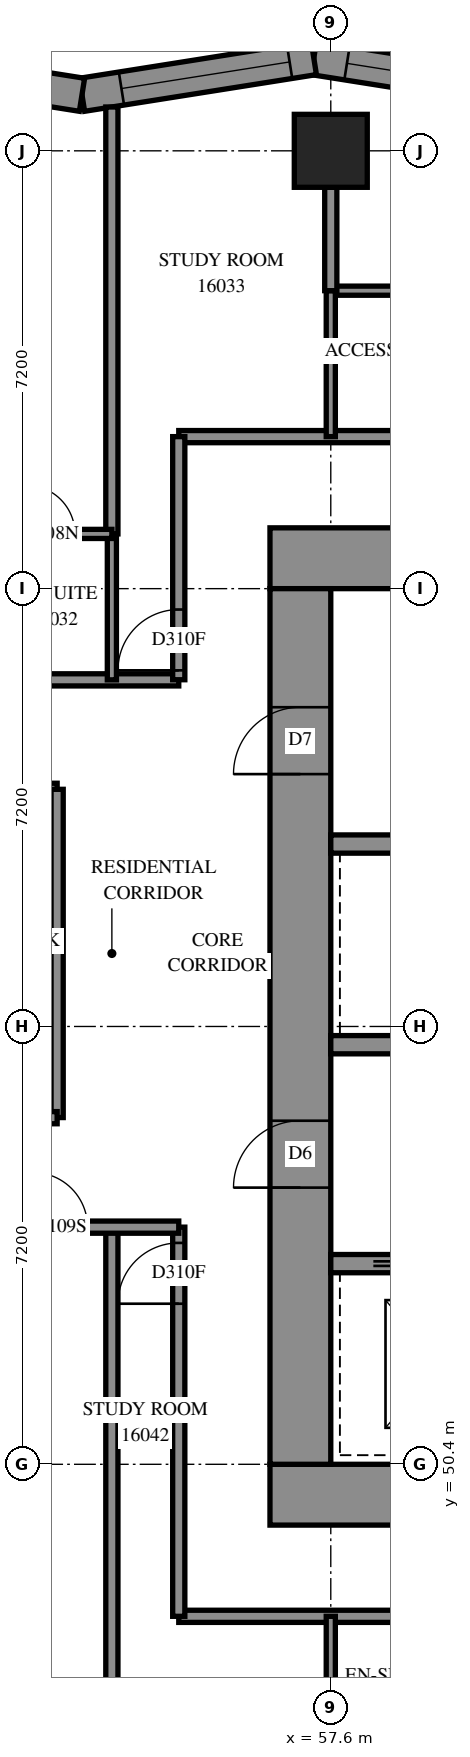
"""IFC4 building model, lengths in metres.
Left out: names, types, materials, properties, quantities, classifications, styles, units other than length and angle.
Written with IfcOpenShell. Run it as: python <this file> out.ifc"""

import sys

from ifc_helpers import new_model, si_unit, direction, frame, frame_2d, origin, origin_2d, place, context, subcontext, project, spatial, polyline, rectangle, outline, extrude, element, fill, save


model = new_model("IFC4")
c1 = context("Model", 3, precision=1e-05, world=origin(), true_north=direction((0.0, 1.0)))
c2 = subcontext(c1, "Body", "Model", "MODEL_VIEW")
j1 = project(units=[si_unit("LENGTHUNIT", "METRE"), si_unit("PLANEANGLEUNIT", "RADIAN")], contexts=[c1])
p1 = place(None, origin())
s1 = spatial("IfcSite", under=j1, at=p1, CompositionType="ELEMENT")
p2 = place(p1, origin())
s2 = spatial("IfcBuilding", under=s1, at=p2, CompositionType="ELEMENT")
p3 = place(p2, frame((0.0, 0.0, 61.0)))
s3 = spatial("IfcBuildingStorey", under=s2, at=p3, CompositionType="ELEMENT", Elevation=61.0)
p4 = place(p3, frame((57.6, 72.0, 0.0), z_axis=(0.0, 0.0, 1.0), x_axis=(1.0, 0.0, 0.0)))
e1 = element("IfcColumn", 1, at=p4, inside=s3, PredefinedType="COLUMN", context=c2, shape_type="SweptSolid", body=[
    extrude(rectangle(XDim=1.2, YDim=1.2, at=origin_2d()), origin(), (0.0, 0.0, 1.0), 3.1),
])
p5 = place(p3, frame((56.6, 49.9, -0.3), z_axis=(0.0, 0.0, 1.0), x_axis=(1.0, 0.0, 0.0)))
e2 = element("IfcWall", 2, at=p5, inside=s3, PredefinedType="SHEAR", context=c2, shape_type="SweptSolid", body=[
    extrude(rectangle(XDim=16.4, YDim=1.0, at=frame_2d((8.2, 0.0))), origin(), (0.0, 0.0, 1.0), 2.7),
])
p6 = place(p3, frame((56.6, 65.3, -0.3), z_axis=(0.0, 0.0, 1.0), x_axis=(1.0, 0.0, 0.0)))
e3 = element("IfcWall", 3, at=p6, inside=s3, PredefinedType="SHEAR", context=c2, shape_type="SweptSolid", body=[
    extrude(rectangle(XDim=16.4, YDim=1.0, at=frame_2d((8.2, 0.0))), origin(), (0.0, 0.0, 1.0), 2.7),
])
p7 = place(p6, frame((11.0, 0.0, 0.3)))
e4 = element("IfcOpeningElement", 4, at=p7, cuts=e3, PredefinedType="OPENING", context=c2, shape_type="SweptSolid", body=[
    extrude(rectangle(XDim=0.8, YDim=2.1, at=frame_2d((0.4, 1.05))), frame((0.0, 0.51, 0.0), z_axis=(0.0, -1.0, 0.0), x_axis=(1.0, 0.0, 0.0)), (0.0, 0.0, 1.0), 1.02),
])
p8 = place(p3, frame((57.1, 50.4, -0.3), z_axis=(0.0, 0.0, 1.0), x_axis=(0.0, 1.0, 0.0)))
e5 = element("IfcWall", 5, at=p8, inside=s3, PredefinedType="SHEAR", context=c2, shape_type="SweptSolid", body=[
    extrude(rectangle(XDim=14.4, YDim=1.0, at=frame_2d((7.2, 0.0))), origin(), (0.0, 0.0, 1.0), 2.7),
])
p9 = place(p8, frame((4.55, 0.0, 0.3)))
e6 = element("IfcOpeningElement", 6, at=p9, cuts=e5, PredefinedType="OPENING", context=c2, shape_type="SweptSolid", body=[
    extrude(rectangle(XDim=1.1, YDim=2.1, at=frame_2d((0.55, 1.05))), frame((0.0, 0.51, 0.0), z_axis=(0.0, -1.0, 0.0), x_axis=(1.0, 0.0, 0.0)), (0.0, 0.0, 1.0), 1.02),
])
p10 = place(p8, frame((11.35, 0.0, 0.3)))
e7 = element("IfcOpeningElement", 7, at=p10, cuts=e5, PredefinedType="OPENING", context=c2, shape_type="SweptSolid", body=[
    extrude(rectangle(XDim=1.1, YDim=2.1, at=frame_2d((0.55, 1.05))), frame((0.0, 0.51, 0.0), z_axis=(0.0, -1.0, 0.0), x_axis=(1.0, 0.0, 0.0)), (0.0, 0.0, 1.0), 1.02),
])
p11 = place(p3, frame((57.6, 53.7, 0.0), z_axis=(0.0, 0.0, 1.0), x_axis=(1.0, 0.0, 0.0)))
e8 = element("IfcWall", 8, at=p11, inside=s3, PredefinedType="SOLIDWALL", context=c2, shape_type="SweptSolid", body=[
    extrude(rectangle(XDim=14.4, YDim=0.3, at=frame_2d((7.2, 0.0))), origin(), (0.0, 0.0, 1.0), 3.1),
])
p12 = place(p11, frame((1.25, 0.0, 0.0)))
e9 = element("IfcOpeningElement", 9, at=p12, cuts=e8, PredefinedType="OPENING", context=c2, shape_type="SweptSolid", body=[
    extrude(rectangle(XDim=1.1, YDim=2.1, at=frame_2d((0.55, 1.05))), frame((0.0, 0.16, 0.0), z_axis=(0.0, -1.0, 0.0), x_axis=(1.0, 0.0, 0.0)), (0.0, 0.0, 1.0), 0.32),
])
p13 = place(p11, frame((4.85, 0.0, 0.0)))
e10 = element("IfcOpeningElement", 10, at=p13, cuts=e8, PredefinedType="OPENING", context=c2, shape_type="SweptSolid", body=[
    extrude(rectangle(XDim=1.1, YDim=2.1, at=frame_2d((0.55, 1.05))), frame((0.0, 0.16, 0.0), z_axis=(0.0, -1.0, 0.0), x_axis=(1.0, 0.0, 0.0)), (0.0, 0.0, 1.0), 0.32),
])
p14 = place(p11, frame((8.45, 0.0, 0.0)))
e11 = element("IfcOpeningElement", 11, at=p14, cuts=e8, PredefinedType="OPENING", context=c2, shape_type="SweptSolid", body=[
    extrude(rectangle(XDim=1.1, YDim=2.1, at=frame_2d((0.55, 1.05))), frame((0.0, 0.16, 0.0), z_axis=(0.0, -1.0, 0.0), x_axis=(1.0, 0.0, 0.0)), (0.0, 0.0, 1.0), 0.32),
])
p15 = place(p11, frame((12.05, 0.0, 0.0)))
e12 = element("IfcOpeningElement", 12, at=p15, cuts=e8, PredefinedType="OPENING", context=c2, shape_type="SweptSolid", body=[
    extrude(rectangle(XDim=1.1, YDim=2.1, at=frame_2d((0.55, 1.05))), frame((0.0, 0.16, 0.0), z_axis=(0.0, -1.0, 0.0), x_axis=(1.0, 0.0, 0.0)), (0.0, 0.0, 1.0), 0.32),
])
p16 = place(p3, frame((57.6, 57.3, 0.0), z_axis=(0.0, 0.0, 1.0), x_axis=(1.0, 0.0, 0.0)))
e13 = element("IfcWall", 13, at=p16, inside=s3, PredefinedType="SOLIDWALL", context=c2, shape_type="SweptSolid", body=[
    extrude(rectangle(XDim=14.4, YDim=0.3, at=frame_2d((7.2, 0.0))), origin(), (0.0, 0.0, 1.0), 3.1),
])
p17 = place(p16, frame((12.05, 0.0, 0.0)))
e14 = element("IfcOpeningElement", 14, at=p17, cuts=e13, PredefinedType="OPENING", context=c2, shape_type="SweptSolid", body=[
    extrude(rectangle(XDim=1.1, YDim=2.1, at=frame_2d((0.55, 1.05))), frame((0.0, 0.16, 0.0), z_axis=(0.0, -1.0, 0.0), x_axis=(1.0, 0.0, 0.0)), (0.0, 0.0, 1.0), 0.32),
])
p18 = place(p3, frame((57.6, 60.6, 0.0), z_axis=(0.0, 0.0, 1.0), x_axis=(1.0, 0.0, 0.0)))
e15 = element("IfcWall", 15, at=p18, inside=s3, PredefinedType="SOLIDWALL", context=c2, shape_type="SweptSolid", body=[
    extrude(rectangle(XDim=7.2, YDim=0.3, at=frame_2d((3.6, 0.0))), origin(), (0.0, 0.0, 1.0), 3.1),
])
p19 = place(p3, frame((61.133, 72.922, 0.0), z_axis=(0.0, 0.0, 1.0), x_axis=(-0.9877213372, 0.1562259905, 0.0)))
e16 = element("IfcWall", 16, at=p19, inside=s3, PredefinedType="SOLIDWALL", context=c2, shape_type="SweptSolid", body=[
    extrude(outline(polyline([(0.043, -0.275), (3.903, -0.275), (3.816, 0.275), (-0.043, 0.275), (0.043, -0.275)])), origin(), (0.0, 0.0, 1.0), 3.1),
])
p20 = place(p19, frame((0.508, 0.0, 0.5)))
e17 = element("IfcOpeningElement", 17, at=p20, cuts=e16, PredefinedType="OPENING", context=c2, shape_type="SweptSolid", body=[
    extrude(rectangle(XDim=2.8, YDim=2.45, at=frame_2d((1.4, 1.225))), frame((0.0, 0.285, 0.0), z_axis=(0.0, -1.0, 0.0), x_axis=(1.0, 0.0, 0.0)), (0.0, 0.0, 1.0), 0.57),
])
p21 = place(p3, frame((57.321, 73.525, 0.0), z_axis=(0.0, 0.0, 1.0), x_axis=(-0.9877213372, -0.1562259905, 0.0)))
e18 = element("IfcWall", 18, at=p21, inside=s3, PredefinedType="SOLIDWALL", context=c2, shape_type="SweptSolid", body=[
    extrude(outline(polyline([(-0.043, -0.275), (3.816, -0.275), (3.903, 0.275), (0.043, 0.275), (-0.043, -0.275)])), origin(), (0.0, 0.0, 1.0), 3.1),
])
p22 = place(p21, frame((0.403, 0.0, 0.5)))
e19 = element("IfcOpeningElement", 19, at=p22, cuts=e18, PredefinedType="OPENING", context=c2, shape_type="SweptSolid", body=[
    extrude(rectangle(XDim=2.8, YDim=2.45, at=frame_2d((1.4, 1.225))), frame((0.0, 0.285, 0.0), z_axis=(0.0, -1.0, 0.0), x_axis=(1.0, 0.0, 0.0)), (0.0, 0.0, 1.0), 0.57),
])
p23 = place(p3, frame((53.509, 72.922, 0.0), z_axis=(0.0, 0.0, 1.0), x_axis=(-0.9877213372, 0.1562259905, 0.0)))
e20 = element("IfcWall", 20, at=p23, inside=s3, PredefinedType="SOLIDWALL", context=c2, shape_type="SweptSolid", body=[
    extrude(outline(polyline([(0.043, -0.275), (3.903, -0.275), (3.816, 0.275), (-0.043, 0.275), (0.043, -0.275)])), origin(), (0.0, 0.0, 1.0), 3.1),
])
p24 = place(p23, frame((1.074, 0.0, 0.5)))
e21 = element("IfcOpeningElement", 21, at=p24, cuts=e20, PredefinedType="OPENING", context=c2, shape_type="SweptSolid", body=[
    extrude(rectangle(XDim=1.2, YDim=2.45, at=frame_2d((0.6, 1.225))), frame((0.0, 0.285, 0.0), z_axis=(0.0, -1.0, 0.0), x_axis=(1.0, 0.0, 0.0)), (0.0, 0.0, 1.0), 0.57),
])
p25 = place(p3, frame((28.8, 61.5, 0.0), z_axis=(0.0, 0.0, 1.0), x_axis=(1.0, 0.0, 0.0)))
e22 = element("IfcWall", 22, at=p25, inside=s3, PredefinedType="PARTITIONING", context=c2, shape_type="SweptSolid", body=[
    extrude(rectangle(XDim=24.3, YDim=0.2, at=frame_2d((12.15, 0.0))), origin(), (0.0, 0.0, 1.0), 3.1),
])
p26 = place(p25, frame((3.899, 0.0, 0.0)))
e23 = element("IfcOpeningElement", 23, at=p26, cuts=e22, PredefinedType="OPENING", context=c2, shape_type="SweptSolid", body=[
    extrude(rectangle(XDim=0.9, YDim=2.1, at=frame_2d((0.45, 1.05))), frame((0.0, 0.11, 0.0), z_axis=(0.0, -1.0, 0.0), x_axis=(1.0, 0.0, 0.0)), (0.0, 0.0, 1.0), 0.22),
])
p27 = place(p25, frame((9.5, 0.0, 0.0)))
e24 = element("IfcOpeningElement", 24, at=p27, cuts=e22, PredefinedType="OPENING", context=c2, shape_type="SweptSolid", body=[
    extrude(rectangle(XDim=0.9, YDim=2.1, at=frame_2d((0.45, 1.05))), frame((0.0, 0.11, 0.0), z_axis=(0.0, -1.0, 0.0), x_axis=(1.0, 0.0, 0.0)), (0.0, 0.0, 1.0), 0.22),
])
p28 = place(p25, frame((11.307, 0.0, 0.0)))
e25 = element("IfcOpeningElement", 25, at=p28, cuts=e22, PredefinedType="OPENING", context=c2, shape_type="SweptSolid", body=[
    extrude(rectangle(XDim=1.0, YDim=2.1, at=frame_2d((0.5, 1.05))), frame((0.0, 0.11, 0.0), z_axis=(0.0, -1.0, 0.0), x_axis=(1.0, 0.0, 0.0)), (0.0, 0.0, 1.0), 0.22),
])
p29 = place(p25, frame((16.7, 0.0, 0.0)))
e26 = element("IfcOpeningElement", 26, at=p29, cuts=e22, PredefinedType="OPENING", context=c2, shape_type="SweptSolid", body=[
    extrude(rectangle(XDim=0.9, YDim=2.1, at=frame_2d((0.45, 1.05))), frame((0.0, 0.11, 0.0), z_axis=(0.0, -1.0, 0.0), x_axis=(1.0, 0.0, 0.0)), (0.0, 0.0, 1.0), 0.22),
])
p30 = place(p25, frame((18.508, 0.0, 0.0)))
e27 = element("IfcOpeningElement", 27, at=p30, cuts=e22, PredefinedType="OPENING", context=c2, shape_type="SweptSolid", body=[
    extrude(rectangle(XDim=1.0, YDim=2.1, at=frame_2d((0.5, 1.05))), frame((0.0, 0.11, 0.0), z_axis=(0.0, -1.0, 0.0), x_axis=(1.0, 0.0, 0.0)), (0.0, 0.0, 1.0), 0.22),
])
p31 = place(p25, frame((23.033, 0.0, 0.0)))
e28 = element("IfcOpeningElement", 28, at=p31, cuts=e22, PredefinedType="OPENING", context=c2, shape_type="SweptSolid", body=[
    extrude(rectangle(XDim=1.0, YDim=2.1, at=frame_2d((0.5, 1.05))), frame((0.0, 0.11, 0.0), z_axis=(0.0, -1.0, 0.0), x_axis=(1.0, 0.0, 0.0)), (0.0, 0.0, 1.0), 0.22),
])
p32 = place(p3, frame((33.302, 63.3, 0.0), z_axis=(0.0, 0.0, 1.0), x_axis=(1.0, 0.0, 0.0)))
e29 = element("IfcWall", 29, at=p32, inside=s3, PredefinedType="PARTITIONING", context=c2, shape_type="SweptSolid", body=[
    extrude(rectangle(XDim=21.798, YDim=0.2, at=frame_2d((10.899, 0.0))), origin(), (0.0, 0.0, 1.0), 3.1),
])
p33 = place(p32, frame((1.091, 0.0, 0.0)))
e30 = element("IfcOpeningElement", 30, at=p33, cuts=e29, PredefinedType="OPENING", context=c2, shape_type="SweptSolid", body=[
    extrude(rectangle(XDim=0.9, YDim=2.1, at=frame_2d((0.45, 1.05))), frame((0.0, 0.11, 0.0), z_axis=(0.0, -1.0, 0.0), x_axis=(1.0, 0.0, 0.0)), (0.0, 0.0, 1.0), 0.22),
])
p34 = place(p32, frame((8.248, 0.0, 0.0)))
e31 = element("IfcOpeningElement", 31, at=p34, cuts=e29, PredefinedType="OPENING", context=c2, shape_type="SweptSolid", body=[
    extrude(rectangle(XDim=0.9, YDim=2.1, at=frame_2d((0.45, 1.05))), frame((0.0, 0.11, 0.0), z_axis=(0.0, -1.0, 0.0), x_axis=(1.0, 0.0, 0.0)), (0.0, 0.0, 1.0), 0.22),
])
p35 = place(p32, frame((15.448, 0.0, 0.0)))
e32 = element("IfcOpeningElement", 32, at=p35, cuts=e29, PredefinedType="OPENING", context=c2, shape_type="SweptSolid", body=[
    extrude(rectangle(XDim=0.9, YDim=2.1, at=frame_2d((0.45, 1.05))), frame((0.0, 0.11, 0.0), z_axis=(0.0, -1.0, 0.0), x_axis=(1.0, 0.0, 0.0)), (0.0, 0.0, 1.0), 0.22),
])
p36 = place(p3, frame((55.1, 67.3, 0.0), z_axis=(0.0, 0.0, 1.0), x_axis=(1.0, 0.0, 0.0)))
e33 = element("IfcWall", 33, at=p36, inside=s3, PredefinedType="PARTITIONING", context=c2, shape_type="SweptSolid", body=[
    extrude(rectangle(XDim=19.4, YDim=0.2, at=frame_2d((9.7, 0.0))), origin(), (0.0, 0.0, 1.0), 3.1),
])
p37 = place(p36, frame((6.361, 0.0, 0.0)))
e34 = element("IfcOpeningElement", 34, at=p37, cuts=e33, PredefinedType="OPENING", context=c2, shape_type="SweptSolid", body=[
    extrude(rectangle(XDim=0.9, YDim=2.1, at=frame_2d((0.45, 1.05))), frame((0.0, 0.11, 0.0), z_axis=(0.0, -1.0, 0.0), x_axis=(1.0, 0.0, 0.0)), (0.0, 0.0, 1.0), 0.22),
])
p38 = place(p36, frame((13.561, 0.0, 0.0)))
e35 = element("IfcOpeningElement", 35, at=p38, cuts=e33, PredefinedType="OPENING", context=c2, shape_type="SweptSolid", body=[
    extrude(rectangle(XDim=0.9, YDim=2.1, at=frame_2d((0.45, 1.05))), frame((0.0, 0.11, 0.0), z_axis=(0.0, -1.0, 0.0), x_axis=(1.0, 0.0, 0.0)), (0.0, 0.0, 1.0), 0.22),
])
p39 = place(p3, frame((55.1, 47.9, 0.0), z_axis=(0.0, 0.0, 1.0), x_axis=(1.0, 0.0, 0.0)))
e36 = element("IfcWall", 36, at=p39, inside=s3, PredefinedType="PARTITIONING", context=c2, shape_type="SweptSolid", body=[
    extrude(rectangle(XDim=19.208, YDim=0.2, at=frame_2d((9.604, 0.0))), origin(), (0.0, 0.0, 1.0), 3.1),
])
p40 = place(p39, frame((6.399, 0.0, 0.0)))
e37 = element("IfcOpeningElement", 37, at=p40, cuts=e36, PredefinedType="OPENING", context=c2, shape_type="SweptSolid", body=[
    extrude(rectangle(XDim=0.9, YDim=2.1, at=frame_2d((0.45, 1.05))), frame((0.0, 0.11, 0.0), z_axis=(0.0, -1.0, 0.0), x_axis=(1.0, 0.0, 0.0)), (0.0, 0.0, 1.0), 0.22),
])
p41 = place(p39, frame((13.561, 0.0, 0.0)))
e38 = element("IfcOpeningElement", 38, at=p41, cuts=e36, PredefinedType="OPENING", context=c2, shape_type="SweptSolid", body=[
    extrude(rectangle(XDim=0.9, YDim=2.1, at=frame_2d((0.45, 1.05))), frame((0.0, 0.11, 0.0), z_axis=(0.0, -1.0, 0.0), x_axis=(1.0, 0.0, 0.0)), (0.0, 0.0, 1.0), 0.22),
])
p42 = place(p3, frame((54.0, 42.312, 0.0), z_axis=(0.0, 0.0, 1.0), x_axis=(0.0, 1.0, 0.0)))
e39 = element("IfcWall", 39, at=p42, inside=s3, PredefinedType="PARTITIONING", context=c2, shape_type="SweptSolid", body=[
    extrude(rectangle(XDim=11.988, YDim=0.2, at=frame_2d((5.994, 0.0))), origin(), (0.0, 0.0, 1.0), 3.1),
])
p43 = place(p3, frame((54.0, 65.7, 0.0), z_axis=(0.0, 0.0, 1.0), x_axis=(0.0, 1.0, 0.0)))
e40 = element("IfcWall", 40, at=p43, inside=s3, PredefinedType="PARTITIONING", context=c2, shape_type="SweptSolid", body=[
    extrude(rectangle(XDim=7.021, YDim=0.2, at=frame_2d((3.51, 0.0))), origin(), (0.0, 0.0, 1.0), 3.1),
])
p44 = place(p3, frame((55.1, 47.9, 0.0), z_axis=(0.0, 0.0, 1.0), x_axis=(0.0, 1.0, 0.0)))
e41 = element("IfcWall", 41, at=p44, inside=s3, PredefinedType="PARTITIONING", context=c2, shape_type="SweptSolid", body=[
    extrude(rectangle(XDim=6.4, YDim=0.2, at=frame_2d((3.2, 0.0))), origin(), (0.0, 0.0, 1.0), 3.1),
])
p45 = place(p44, frame((5.141, 0.0, 0.0)))
e42 = element("IfcOpeningElement", 42, at=p45, cuts=e41, PredefinedType="OPENING", context=c2, shape_type="SweptSolid", body=[
    extrude(rectangle(XDim=1.0, YDim=2.1, at=frame_2d((0.5, 1.05))), frame((0.0, 0.11, 0.0), z_axis=(0.0, -1.0, 0.0), x_axis=(1.0, 0.0, 0.0)), (0.0, 0.0, 1.0), 0.22),
])
p46 = place(p3, frame((53.1, 56.102, 0.0), z_axis=(0.0, 0.0, 1.0), x_axis=(0.0, 1.0, 0.0)))
e43 = element("IfcWall", 43, at=p46, inside=s3, PredefinedType="PARTITIONING", context=c2, shape_type="SweptSolid", body=[
    extrude(rectangle(XDim=5.398, YDim=0.2, at=frame_2d((2.699, 0.0))), origin(), (0.0, 0.0, 1.0), 3.1),
])
p47 = place(p3, frame((50.4, 54.3, 0.0), z_axis=(0.0, 0.0, 1.0), x_axis=(1.0, 0.0, 0.0)))
e44 = element("IfcWall", 44, at=p47, inside=s3, PredefinedType="PARTITIONING", context=c2, shape_type="SweptSolid", body=[
    extrude(rectangle(XDim=4.7, YDim=0.2, at=frame_2d((2.35, 0.0))), origin(), (0.0, 0.0, 1.0), 3.1),
])
p48 = place(p47, frame((2.3, 0.0, 0.0)))
e45 = element("IfcOpeningElement", 45, at=p48, cuts=e44, PredefinedType="OPENING", context=c2, shape_type="SweptSolid", body=[
    extrude(rectangle(XDim=0.9, YDim=2.1, at=frame_2d((0.45, 1.05))), frame((0.0, 0.11, 0.0), z_axis=(0.0, -1.0, 0.0), x_axis=(1.0, 0.0, 0.0)), (0.0, 0.0, 1.0), 0.22),
])
p49 = place(p3, frame((55.1, 63.302, 0.0), z_axis=(0.0, 0.0, 1.0), x_axis=(0.0, 1.0, 0.0)))
e46 = element("IfcWall", 46, at=p49, inside=s3, PredefinedType="PARTITIONING", context=c2, shape_type="SweptSolid", body=[
    extrude(rectangle(XDim=3.998, YDim=0.2, at=frame_2d((1.999, 0.0))), origin(), (0.0, 0.0, 1.0), 3.1),
])
p50 = place(p49, frame((0.154, 0.0, 0.0)))
e47 = element("IfcOpeningElement", 47, at=p50, cuts=e46, PredefinedType="OPENING", context=c2, shape_type="SweptSolid", body=[
    extrude(rectangle(XDim=1.0, YDim=2.1, at=frame_2d((0.5, 1.05))), frame((0.0, 0.11, 0.0), z_axis=(0.0, -1.0, 0.0), x_axis=(1.0, 0.0, 0.0)), (0.0, 0.0, 1.0), 0.22),
])
p51 = place(p3, frame((57.6, 69.7, 0.0), z_axis=(0.0, 0.0, 1.0), x_axis=(1.0, 0.0, 0.0)))
e48 = element("IfcWall", 48, at=p51, inside=s3, PredefinedType="PARTITIONING", context=c2, shape_type="SweptSolid", body=[
    extrude(rectangle(XDim=3.2, YDim=0.15, at=frame_2d((1.6, 0.0))), origin(), (0.0, 0.0, 1.0), 3.1),
])
p52 = place(p51, frame((1.196, 0.0, 0.0)))
e49 = element("IfcOpeningElement", 49, at=p52, cuts=e48, PredefinedType="OPENING", context=c2, shape_type="SweptSolid", body=[
    extrude(rectangle(XDim=0.8, YDim=2.1, at=frame_2d((0.4, 1.05))), frame((0.0, 0.085, 0.0), z_axis=(0.0, -1.0, 0.0), x_axis=(1.0, 0.0, 0.0)), (0.0, 0.0, 1.0), 0.17),
])
p53 = place(p3, frame((50.4, 56.1, 0.0), z_axis=(0.0, 0.0, 1.0), x_axis=(1.0, 0.0, 0.0)))
e50 = element("IfcWall", 50, at=p53, inside=s3, PredefinedType="PARTITIONING", context=c2, shape_type="SweptSolid", body=[
    extrude(rectangle(XDim=2.7, YDim=0.2, at=frame_2d((1.35, 0.0))), origin(), (0.0, 0.0, 1.0), 3.1),
])
for number, where, z_axis, x_axis in (
    (51, (54.0, 63.3, 0.0), (0.0, 0.0, 1.0), (0.0, 1.0, 0.0)),
    (52, (57.6, 67.3, 0.0), (0.0, 0.0, 1.0), (0.0, 1.0, 0.0)),
    (53, (57.6, 45.5, 0.0), (0.0, 0.0, 1.0), (0.0, 1.0, 0.0)),
):
    element("IfcWall", number, at=place(p3, frame(where, z_axis=z_axis, x_axis=x_axis)), inside=s3, PredefinedType="PARTITIONING", context=c2, shape_type="SweptSolid", body=[
        extrude(rectangle(XDim=2.4, YDim=0.15, at=frame_2d((1.2, 0.0))), origin(), (0.0, 0.0, 1.0), 3.1),
    ])
p54 = place(p3, frame((52.1, 65.7, 0.0), z_axis=(0.0, 0.0, 1.0), x_axis=(1.0, 0.0, 0.0)))
e54 = element("IfcWall", 54, at=p54, inside=s3, PredefinedType="PARTITIONING", context=c2, shape_type="SweptSolid", body=[
    extrude(rectangle(XDim=1.9, YDim=0.15, at=frame_2d((0.95, 0.0))), origin(), (0.0, 0.0, 1.0), 3.1),
])
p55 = place(p54, frame((0.493, 0.0, 0.0)))
e55 = element("IfcOpeningElement", 55, at=p55, cuts=e54, PredefinedType="OPENING", context=c2, shape_type="SweptSolid", body=[
    extrude(rectangle(XDim=0.8, YDim=2.1, at=frame_2d((0.4, 1.05))), frame((0.0, 0.085, 0.0), z_axis=(0.0, -1.0, 0.0), x_axis=(1.0, 0.0, 0.0)), (0.0, 0.0, 1.0), 0.17),
])
p56 = place(p3, frame((57.6, 69.7, 0.0), z_axis=(0.0, 0.0, 1.0), x_axis=(0.0, 1.0, 0.0)))
e56 = element("IfcWall", 56, at=p56, inside=s3, PredefinedType="PARTITIONING", context=c2, shape_type="SweptSolid", body=[
    extrude(rectangle(XDim=1.7, YDim=0.2, at=frame_2d((0.85, 0.0))), origin(), (0.0, 0.0, 1.0), 3.1),
])
p57 = place(p20, origin())
e57 = element("IfcWindow", 57, at=p57, inside=s3, PartitioningType="SINGLE_PANEL", PredefinedType="WINDOW", context=c2, shape_type="SweptSolid", body=[
    extrude(rectangle(XDim=2.8, YDim=2.45, at=frame_2d((1.4, 1.225))), frame((0.0, 0.155, 0.0), z_axis=(0.0, -1.0, 0.0), x_axis=(1.0, 0.0, 0.0)), (0.0, 0.0, 1.0), 0.06),
])
fill(e17, e57)
p58 = place(p22, origin())
e58 = element("IfcWindow", 58, at=p58, inside=s3, PartitioningType="SINGLE_PANEL", PredefinedType="WINDOW", context=c2, shape_type="SweptSolid", body=[
    extrude(rectangle(XDim=2.8, YDim=2.45, at=frame_2d((1.4, 1.225))), frame((0.0, 0.155, 0.0), z_axis=(0.0, -1.0, 0.0), x_axis=(1.0, 0.0, 0.0)), (0.0, 0.0, 1.0), 0.06),
])
fill(e19, e58)
p59 = place(p9, origin())
e59 = element("IfcDoor", 59, at=p59, inside=s3, OperationType="DOUBLE_DOOR_SINGLE_SWING", PredefinedType="DOOR", context=c2, shape_type="SweptSolid", body=[
    extrude(rectangle(XDim=1.1, YDim=2.1, at=frame_2d((0.55, 1.05))), frame((0.0, 0.025, 0.0), z_axis=(0.0, -1.0, 0.0), x_axis=(1.0, 0.0, 0.0)), (0.0, 0.0, 1.0), 0.05),
])
fill(e6, e59)
p60 = place(p10, origin())
e60 = element("IfcDoor", 60, at=p60, inside=s3, OperationType="SINGLE_SWING_LEFT", PredefinedType="DOOR", context=c2, shape_type="SweptSolid", body=[
    extrude(rectangle(XDim=1.1, YDim=2.1, at=frame_2d((0.55, 1.05))), frame((0.0, 0.025, 0.0), z_axis=(0.0, -1.0, 0.0), x_axis=(1.0, 0.0, 0.0)), (0.0, 0.0, 1.0), 0.05),
])
fill(e7, e60)
p61 = place(p55, origin())
e61 = element("IfcDoor", 61, at=p61, inside=s3, OperationType="SINGLE_SWING_RIGHT", PredefinedType="DOOR", context=c2, shape_type="SweptSolid", body=[
    extrude(rectangle(XDim=0.8, YDim=2.1, at=frame_2d((0.4, 1.05))), frame((0.0, 0.025, 0.0), z_axis=(0.0, -1.0, 0.0), x_axis=(1.0, 0.0, 0.0)), (0.0, 0.0, 1.0), 0.05),
])
fill(e55, e61)
p62 = place(p50, origin())
e62 = element("IfcDoor", 62, at=p62, inside=s3, OperationType="SINGLE_SWING_LEFT", PredefinedType="DOOR", context=c2, shape_type="SweptSolid", body=[
    extrude(rectangle(XDim=1.0, YDim=2.1, at=frame_2d((0.5, 1.05))), frame((0.0, 0.025, 0.0), z_axis=(0.0, -1.0, 0.0), x_axis=(1.0, 0.0, 0.0)), (0.0, 0.0, 1.0), 0.05),
])
fill(e47, e62)
p63 = place(p48, origin())
e63 = element("IfcDoor", 63, at=p63, inside=s3, OperationType="SINGLE_SWING_LEFT", PredefinedType="DOOR", context=c2, shape_type="SweptSolid", body=[
    extrude(rectangle(XDim=0.9, YDim=2.1, at=frame_2d((0.45, 1.05))), frame((0.0, 0.025, 0.0), z_axis=(0.0, -1.0, 0.0), x_axis=(1.0, 0.0, 0.0)), (0.0, 0.0, 1.0), 0.05),
])
fill(e45, e63)
p64 = place(p45, origin())
e64 = element("IfcDoor", 64, at=p64, inside=s3, OperationType="SINGLE_SWING_RIGHT", PredefinedType="DOOR", context=c2, shape_type="SweptSolid", body=[
    extrude(rectangle(XDim=1.0, YDim=2.1, at=frame_2d((0.5, 1.05))), frame((0.0, 0.025, 0.0), z_axis=(0.0, -1.0, 0.0), x_axis=(1.0, 0.0, 0.0)), (0.0, 0.0, 1.0), 0.05),
])
fill(e42, e64)
save(model, sys.argv[1])
